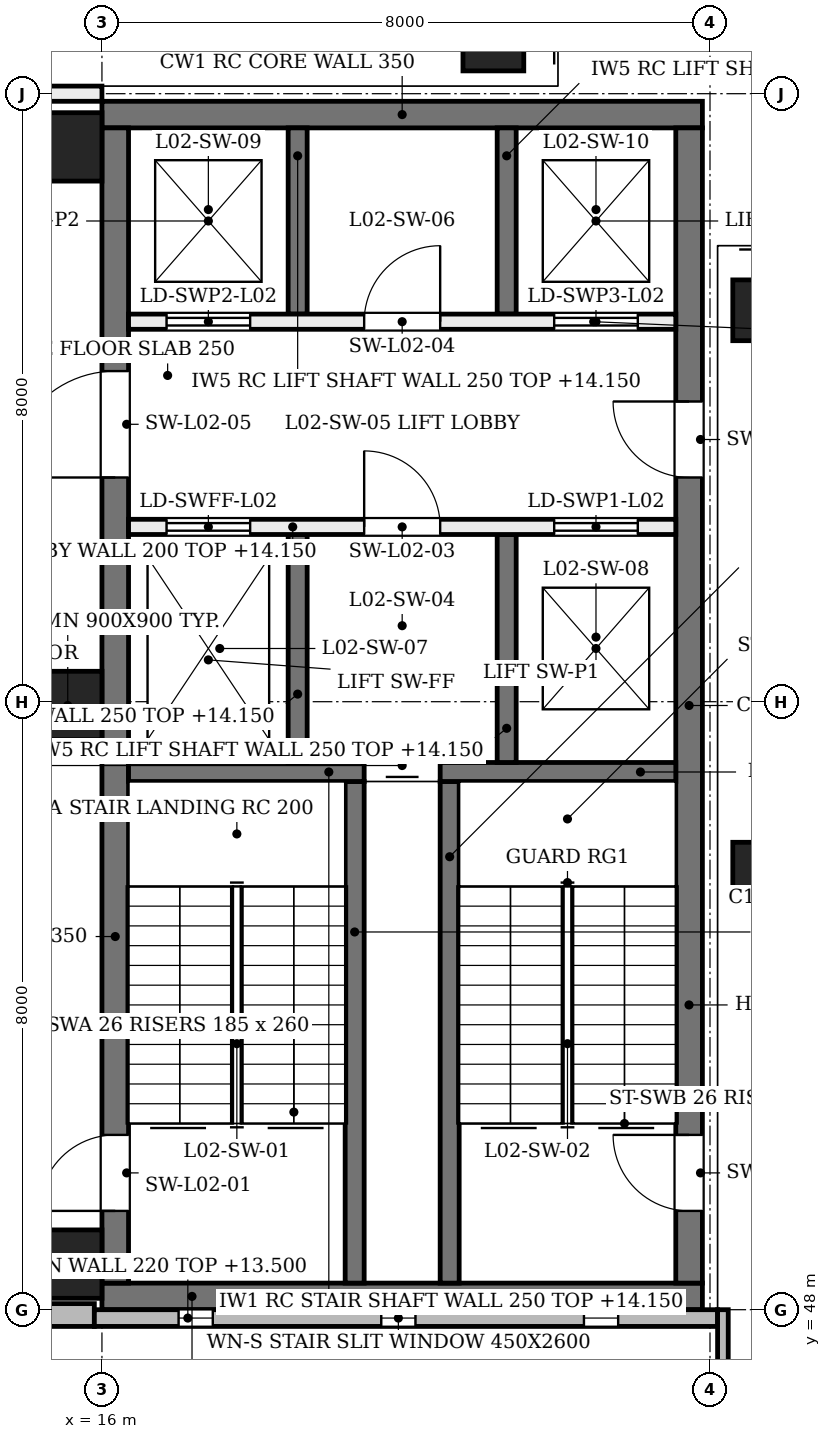
"""IFC4 building model, lengths in metres.
Left out: names, types, materials, properties, quantities, classifications, styles, units other than length and angle.
Written with IfcOpenShell. Run it as: python <this file> out.ifc"""

import sys

from ifc_helpers import new_model, si_unit, direction, frame, frame_2d, origin, origin_2d, place, context, subcontext, project, spatial, rectangle, extrude, element, fill, save


model = new_model("IFC4")
c1 = context("Model", 3, precision=1e-05, world=origin(), true_north=direction((0.0, 1.0)))
c2 = subcontext(c1, "Body", "Model", "MODEL_VIEW")
j1 = project(units=[si_unit("LENGTHUNIT", "METRE"), si_unit("PLANEANGLEUNIT", "RADIAN")], contexts=[c1])
p1 = place(None, origin())
s1 = spatial("IfcSite", under=j1, at=p1, CompositionType="ELEMENT")
p2 = place(p1, origin())
s2 = spatial("IfcBuilding", under=s1, at=p2, CompositionType="ELEMENT")
p3 = place(p2, frame((0.0, 0.0, 9.6)))
s3 = spatial("IfcBuildingStorey", under=s2, at=p3, CompositionType="ELEMENT", Elevation=9.6)
for number, where, z_axis, x_axis in (
    (1, (16.0, 48.175, 0.0), (0.0, 0.0, 1.0), (1.0, 0.0, 0.0)),
    (2, (16.0, 63.725, 0.0), (0.0, 0.0, 1.0), (1.0, 0.0, 0.0)),
):
    element("IfcWall", number, at=place(p3, frame(where, z_axis=z_axis, x_axis=x_axis)), inside=s3, PredefinedType="SHEAR", context=c2, shape_type="SweptSolid", body=[
        extrude(rectangle(XDim=7.9, YDim=0.35, at=frame_2d((3.95, 0.0))), origin(), (0.0, 0.0, 1.0), 4.58),
    ])
p4 = place(p3, frame((16.175, 48.35, 0.0), z_axis=(0.0, 0.0, 1.0), x_axis=(0.0, 1.0, 0.0)))
e3 = element("IfcWall", 3, at=p4, inside=s3, PredefinedType="SHEAR", context=c2, shape_type="SweptSolid", body=[
    extrude(rectangle(XDim=15.2, YDim=0.35, at=frame_2d((7.6, 0.0))), origin(), (0.0, 0.0, 1.0), 4.58),
])
p5 = place(p4, frame((0.95, 0.0, 0.0)))
e4 = element("IfcOpeningElement", 4, at=p5, cuts=e3, PredefinedType="OPENING", context=c2, shape_type="SweptSolid", body=[
    extrude(rectangle(XDim=1.0, YDim=2.1, at=frame_2d((0.5, 1.05))), frame((0.0, 0.185, 0.0), z_axis=(0.0, -1.0, 0.0), x_axis=(1.0, 0.0, 0.0)), (0.0, 0.0, 1.0), 0.37),
])
p6 = place(p4, frame((10.6, 0.0, 0.0)))
e5 = element("IfcOpeningElement", 5, at=p6, cuts=e3, PredefinedType="OPENING", context=c2, shape_type="SweptSolid", body=[
    extrude(rectangle(XDim=1.4, YDim=2.1, at=frame_2d((0.7, 1.05))), frame((0.0, 0.185, 0.0), z_axis=(0.0, -1.0, 0.0), x_axis=(1.0, 0.0, 0.0)), (0.0, 0.0, 1.0), 0.37),
])
p7 = place(p3, frame((23.725, 48.35, 0.0), z_axis=(0.0, 0.0, 1.0), x_axis=(0.0, 1.0, 0.0)))
e6 = element("IfcWall", 6, at=p7, inside=s3, PredefinedType="SHEAR", context=c2, shape_type="SweptSolid", body=[
    extrude(rectangle(XDim=15.2, YDim=0.35, at=frame_2d((7.6, 0.0))), origin(), (0.0, 0.0, 1.0), 4.58),
])
p8 = place(p7, frame((0.95, 0.0, 0.0)))
e7 = element("IfcOpeningElement", 7, at=p8, cuts=e6, PredefinedType="OPENING", context=c2, shape_type="SweptSolid", body=[
    extrude(rectangle(XDim=1.0, YDim=2.1, at=frame_2d((0.5, 1.05))), frame((0.0, 0.185, 0.0), z_axis=(0.0, -1.0, 0.0), x_axis=(1.0, 0.0, 0.0)), (0.0, 0.0, 1.0), 0.37),
])
p9 = place(p7, frame((10.6, 0.0, 0.0)))
e8 = element("IfcOpeningElement", 8, at=p9, cuts=e6, PredefinedType="OPENING", context=c2, shape_type="SweptSolid", body=[
    extrude(rectangle(XDim=1.0, YDim=2.1, at=frame_2d((0.5, 1.05))), frame((0.0, 0.185, 0.0), z_axis=(0.0, -1.0, 0.0), x_axis=(1.0, 0.0, 0.0)), (0.0, 0.0, 1.0), 0.37),
])
for number, where, z_axis, x_axis in (
    (9, (15.55, 48.6, 0.0), (0.0, 0.0, 1.0), (1.0, 0.0, 0.0)),
    (10, (15.55, 55.95, 0.0), (0.0, 0.0, 1.0), (1.0, 0.0, 0.0)),
    (11, (15.55, 63.3, 0.0), (0.0, 0.0, 1.0), (1.0, 0.0, 0.0)),
):
    element("IfcColumn", number, at=place(p3, frame(where, z_axis=z_axis, x_axis=x_axis)), inside=s3, PredefinedType="COLUMN", context=c2, shape_type="SweptSolid", body=[
        extrude(rectangle(XDim=0.9, YDim=0.9, at=origin_2d()), origin(), (0.0, 0.0, 1.0), 4.8),
    ])
for number, where, z_axis, x_axis in (
    (12, (24.7, 54.0, 0.0), (0.0, -0.204, 0.979), (1.0, 0.0, 0.0)),
    (13, (24.7, 61.4, 0.0), (0.0, -0.204, 0.979), (1.0, 0.0, 0.0)),
    (14, (21.4, 64.7, 0.0), (-0.204, 0.0, 0.979), (0.0, -1.0, 0.0)),
):
    element("IfcColumn", number, at=place(p3, frame(where, z_axis=z_axis, x_axis=x_axis)), inside=s3, PredefinedType="COLUMN", context=c2, shape_type="SweptSolid", body=[
        extrude(rectangle(XDim=0.8, YDim=0.8, at=origin_2d()), origin(), (0.0, 0.0, 1.0), 4.903),
    ])
p10 = place(p3, frame((8.0, 47.93, 0.0), z_axis=(0.0, 0.0, 1.0), x_axis=(1.0, 0.0, 0.0)))
e15 = element("IfcWall", 15, at=p10, inside=s3, PredefinedType="SOLIDWALL", context=c2, shape_type="SweptSolid", body=[
    extrude(rectangle(XDim=7.9, YDim=0.3, at=frame_2d((3.95, 0.0))), origin(), (0.0, 0.0, 1.0), 3.9),
])
p11 = place(p10, frame((0.717, 0.0, 0.75)))
e16 = element("IfcOpeningElement", 16, at=p11, cuts=e15, PredefinedType="OPENING", context=c2, shape_type="SweptSolid", body=[
    extrude(rectangle(XDim=1.2, YDim=3.1, at=frame_2d((0.6, 1.55))), frame((0.0, 0.16, 0.0), z_axis=(0.0, -1.0, 0.0), x_axis=(1.0, 0.0, 0.0)), (0.0, 0.0, 1.0), 0.32),
])
p12 = place(p10, frame((3.35, 0.0, 0.75)))
e17 = element("IfcOpeningElement", 17, at=p12, cuts=e15, PredefinedType="OPENING", context=c2, shape_type="SweptSolid", body=[
    extrude(rectangle(XDim=1.2, YDim=3.1, at=frame_2d((0.6, 1.55))), frame((0.0, 0.16, 0.0), z_axis=(0.0, -1.0, 0.0), x_axis=(1.0, 0.0, 0.0)), (0.0, 0.0, 1.0), 0.32),
])
p13 = place(p10, frame((5.983, 0.0, 0.75)))
e18 = element("IfcOpeningElement", 18, at=p13, cuts=e15, PredefinedType="OPENING", context=c2, shape_type="SweptSolid", body=[
    extrude(rectangle(XDim=1.2, YDim=3.1, at=frame_2d((0.6, 1.55))), frame((0.0, 0.16, 0.0), z_axis=(0.0, -1.0, 0.0), x_axis=(1.0, 0.0, 0.0)), (0.0, 0.0, 1.0), 0.32),
])
p14 = place(p3, frame((15.9, 47.89, 0.0), z_axis=(0.0, 0.0, 1.0), x_axis=(1.0, 0.0, 0.0)))
e19 = element("IfcWall", 19, at=p14, inside=s3, PredefinedType="SOLIDWALL", context=c2, shape_type="SweptSolid", body=[
    extrude(rectangle(XDim=8.2, YDim=0.22, at=frame_2d((4.1, 0.0))), origin(), (0.0, 0.0, 1.0), 3.9),
])
p15 = place(p14, frame((1.108, 0.0, 0.9)))
e20 = element("IfcOpeningElement", 20, at=p15, cuts=e19, PredefinedType="OPENING", context=c2, shape_type="SweptSolid", body=[
    extrude(rectangle(XDim=0.45, YDim=2.6, at=frame_2d((0.225, 1.3))), frame((0.0, 0.12, 0.0), z_axis=(0.0, -1.0, 0.0), x_axis=(1.0, 0.0, 0.0)), (0.0, 0.0, 1.0), 0.24),
])
p16 = place(p14, frame((3.775, 0.0, 0.9)))
e21 = element("IfcOpeningElement", 21, at=p16, cuts=e19, PredefinedType="OPENING", context=c2, shape_type="SweptSolid", body=[
    extrude(rectangle(XDim=0.45, YDim=2.6, at=frame_2d((0.225, 1.3))), frame((0.0, 0.12, 0.0), z_axis=(0.0, -1.0, 0.0), x_axis=(1.0, 0.0, 0.0)), (0.0, 0.0, 1.0), 0.24),
])
p17 = place(p14, frame((6.442, 0.0, 0.9)))
e22 = element("IfcOpeningElement", 22, at=p17, cuts=e19, PredefinedType="OPENING", context=c2, shape_type="SweptSolid", body=[
    extrude(rectangle(XDim=0.45, YDim=2.6, at=frame_2d((0.225, 1.3))), frame((0.0, 0.12, 0.0), z_axis=(0.0, -1.0, 0.0), x_axis=(1.0, 0.0, 0.0)), (0.0, 0.0, 1.0), 0.24),
])
p18 = place(p3, frame((24.17, 46.0, 0.0), z_axis=(0.0, 0.0, 1.0), x_axis=(0.0, 1.0, 0.0)))
e23 = element("IfcWall", 23, at=p18, inside=s3, PredefinedType="SOLIDWALL", context=c2, shape_type="SweptSolid", body=[
    extrude(rectangle(XDim=2.0, YDim=0.14, at=frame_2d((1.0, 0.0))), origin(), (0.0, 0.0, 1.0), 3.9),
])
for number, where, z_axis, x_axis in (
    (24, (19.325, 48.35, 0.0), (0.0, 0.0, 1.0), (0.0, 1.0, 0.0)),
    (25, (20.575, 48.35, 0.0), (0.0, 0.0, 1.0), (0.0, 1.0, 0.0)),
):
    element("IfcWall", number, at=place(p3, frame(where, z_axis=z_axis, x_axis=x_axis)), inside=s3, PredefinedType="SOLIDWALL", context=c2, shape_type="SweptSolid", body=[
        extrude(rectangle(XDim=6.6, YDim=0.25, at=frame_2d((3.3, 0.0))), origin(), (0.0, 0.0, 1.0), 4.55),
    ])
p19 = place(p3, frame((16.35, 55.075, 0.0), z_axis=(0.0, 0.0, 1.0), x_axis=(1.0, 0.0, 0.0)))
e26 = element("IfcWall", 26, at=p19, inside=s3, PredefinedType="SOLIDWALL", context=c2, shape_type="SweptSolid", body=[
    extrude(rectangle(XDim=3.1, YDim=0.25, at=frame_2d((1.55, 0.0))), origin(), (0.0, 0.0, 1.0), 4.55),
])
p20 = place(p3, frame((20.45, 55.075, 0.0), z_axis=(0.0, 0.0, 1.0), x_axis=(1.0, 0.0, 0.0)))
e27 = element("IfcWall", 27, at=p20, inside=s3, PredefinedType="SOLIDWALL", context=c2, shape_type="SweptSolid", body=[
    extrude(rectangle(XDim=3.1, YDim=0.25, at=frame_2d((1.55, 0.0))), origin(), (0.0, 0.0, 1.0), 4.55),
])
p21 = place(p3, frame((18.575, 55.2, 0.0), z_axis=(0.0, 0.0, 1.0), x_axis=(0.0, 1.0, 0.0)))
e28 = element("IfcWall", 28, at=p21, inside=s3, PredefinedType="SOLIDWALL", context=c2, shape_type="SweptSolid", body=[
    extrude(rectangle(XDim=3.0, YDim=0.25, at=frame_2d((1.5, 0.0))), origin(), (0.0, 0.0, 1.0), 4.55),
])
p22 = place(p3, frame((18.575, 61.1, 0.0), z_axis=(0.0, 0.0, 1.0), x_axis=(0.0, 1.0, 0.0)))
e29 = element("IfcWall", 29, at=p22, inside=s3, PredefinedType="SOLIDWALL", context=c2, shape_type="SweptSolid", body=[
    extrude(rectangle(XDim=2.45, YDim=0.25, at=frame_2d((1.225, 0.0))), origin(), (0.0, 0.0, 1.0), 4.55),
])
p23 = place(p3, frame((21.325, 55.2, 0.0), z_axis=(0.0, 0.0, 1.0), x_axis=(0.0, 1.0, 0.0)))
e30 = element("IfcWall", 30, at=p23, inside=s3, PredefinedType="SOLIDWALL", context=c2, shape_type="SweptSolid", body=[
    extrude(rectangle(XDim=3.0, YDim=0.25, at=frame_2d((1.5, 0.0))), origin(), (0.0, 0.0, 1.0), 4.55),
])
p24 = place(p3, frame((21.325, 61.1, 0.0), z_axis=(0.0, 0.0, 1.0), x_axis=(0.0, 1.0, 0.0)))
e31 = element("IfcWall", 31, at=p24, inside=s3, PredefinedType="SOLIDWALL", context=c2, shape_type="SweptSolid", body=[
    extrude(rectangle(XDim=2.45, YDim=0.25, at=frame_2d((1.225, 0.0))), origin(), (0.0, 0.0, 1.0), 4.55),
])
p25 = place(p3, frame((16.35, 58.3, 0.0), z_axis=(0.0, 0.0, 1.0), x_axis=(1.0, 0.0, 0.0)))
e32 = element("IfcWall", 32, at=p25, inside=s3, PredefinedType="SOLIDWALL", context=c2, shape_type="SweptSolid", body=[
    extrude(rectangle(XDim=7.2, YDim=0.2, at=frame_2d((3.6, 0.0))), origin(), (0.0, 0.0, 1.0), 4.55),
])
p26 = place(p25, frame((0.5, 0.0, 0.0)))
e33 = element("IfcOpeningElement", 33, at=p26, cuts=e32, PredefinedType="OPENING", context=c2, shape_type="SweptSolid", body=[
    extrude(rectangle(XDim=1.1, YDim=2.1, at=frame_2d((0.55, 1.05))), frame((0.0, 0.11, 0.0), z_axis=(0.0, -1.0, 0.0), x_axis=(1.0, 0.0, 0.0)), (0.0, 0.0, 1.0), 0.22),
])
p27 = place(p25, frame((5.6, 0.0, 0.0)))
e34 = element("IfcOpeningElement", 34, at=p27, cuts=e32, PredefinedType="OPENING", context=c2, shape_type="SweptSolid", body=[
    extrude(rectangle(XDim=1.1, YDim=2.1, at=frame_2d((0.55, 1.05))), frame((0.0, 0.11, 0.0), z_axis=(0.0, -1.0, 0.0), x_axis=(1.0, 0.0, 0.0)), (0.0, 0.0, 1.0), 0.22),
])
p28 = place(p25, frame((3.1, 0.0, 0.0)))
e35 = element("IfcOpeningElement", 35, at=p28, cuts=e32, PredefinedType="OPENING", context=c2, shape_type="SweptSolid", body=[
    extrude(rectangle(XDim=1.0, YDim=2.1, at=frame_2d((0.5, 1.05))), frame((0.0, 0.11, 0.0), z_axis=(0.0, -1.0, 0.0), x_axis=(1.0, 0.0, 0.0)), (0.0, 0.0, 1.0), 0.22),
])
p29 = place(p3, frame((16.35, 61.0, 0.0), z_axis=(0.0, 0.0, 1.0), x_axis=(1.0, 0.0, 0.0)))
e36 = element("IfcWall", 36, at=p29, inside=s3, PredefinedType="SOLIDWALL", context=c2, shape_type="SweptSolid", body=[
    extrude(rectangle(XDim=7.2, YDim=0.2, at=frame_2d((3.6, 0.0))), origin(), (0.0, 0.0, 1.0), 4.55),
])
p30 = place(p29, frame((0.5, 0.0, 0.0)))
e37 = element("IfcOpeningElement", 37, at=p30, cuts=e36, PredefinedType="OPENING", context=c2, shape_type="SweptSolid", body=[
    extrude(rectangle(XDim=1.1, YDim=2.1, at=frame_2d((0.55, 1.05))), frame((0.0, 0.11, 0.0), z_axis=(0.0, -1.0, 0.0), x_axis=(1.0, 0.0, 0.0)), (0.0, 0.0, 1.0), 0.22),
])
p31 = place(p29, frame((5.6, 0.0, 0.0)))
e38 = element("IfcOpeningElement", 38, at=p31, cuts=e36, PredefinedType="OPENING", context=c2, shape_type="SweptSolid", body=[
    extrude(rectangle(XDim=1.1, YDim=2.1, at=frame_2d((0.55, 1.05))), frame((0.0, 0.11, 0.0), z_axis=(0.0, -1.0, 0.0), x_axis=(1.0, 0.0, 0.0)), (0.0, 0.0, 1.0), 0.22),
])
p32 = place(p29, frame((3.1, 0.0, 0.0)))
e39 = element("IfcOpeningElement", 39, at=p32, cuts=e36, PredefinedType="OPENING", context=c2, shape_type="SweptSolid", body=[
    extrude(rectangle(XDim=1.0, YDim=2.1, at=frame_2d((0.5, 1.05))), frame((0.0, 0.11, 0.0), z_axis=(0.0, -1.0, 0.0), x_axis=(1.0, 0.0, 0.0)), (0.0, 0.0, 1.0), 0.22),
])
p33 = place(p3, frame((12.4, 64.0, 0.0), z_axis=(0.0, 0.0, 1.0), x_axis=(1.0, 0.0, 0.0)))
e40 = element("IfcWall", 40, at=p33, inside=s3, PredefinedType="PARTITIONING", context=c2, shape_type="SweptSolid", body=[
    extrude(rectangle(XDim=3.6, YDim=0.2, at=frame_2d((1.8, 0.0))), origin(), (0.0, 0.0, 1.0), 3.88),
])
p34 = place(p33, frame((1.8, 0.0, 0.0)))
e41 = element("IfcOpeningElement", 41, at=p34, cuts=e40, PredefinedType="OPENING", context=c2, shape_type="SweptSolid", body=[
    extrude(rectangle(XDim=0.9, YDim=2.1, at=frame_2d((0.45, 1.05))), frame((0.0, 0.11, 0.0), z_axis=(0.0, -1.0, 0.0), x_axis=(1.0, 0.0, 0.0)), (0.0, 0.0, 1.0), 0.22),
])
p35 = place(p15, origin())
e42 = element("IfcWindow", 42, at=p35, inside=s3, PartitioningType="SINGLE_PANEL", PredefinedType="WINDOW", context=c2, shape_type="SweptSolid", body=[
    extrude(rectangle(XDim=0.45, YDim=2.6, at=frame_2d((0.225, 1.3))), frame((0.0, 0.03, 0.0), z_axis=(0.0, -1.0, 0.0), x_axis=(1.0, 0.0, 0.0)), (0.0, 0.0, 1.0), 0.06),
])
fill(e20, e42)
p36 = place(p16, origin())
e43 = element("IfcWindow", 43, at=p36, inside=s3, PartitioningType="SINGLE_PANEL", PredefinedType="WINDOW", context=c2, shape_type="SweptSolid", body=[
    extrude(rectangle(XDim=0.45, YDim=2.6, at=frame_2d((0.225, 1.3))), frame((0.0, 0.03, 0.0), z_axis=(0.0, -1.0, 0.0), x_axis=(1.0, 0.0, 0.0)), (0.0, 0.0, 1.0), 0.06),
])
fill(e21, e43)
p37 = place(p17, origin())
e44 = element("IfcWindow", 44, at=p37, inside=s3, PartitioningType="SINGLE_PANEL", PredefinedType="WINDOW", context=c2, shape_type="SweptSolid", body=[
    extrude(rectangle(XDim=0.45, YDim=2.6, at=frame_2d((0.225, 1.3))), frame((0.0, 0.03, 0.0), z_axis=(0.0, -1.0, 0.0), x_axis=(1.0, 0.0, 0.0)), (0.0, 0.0, 1.0), 0.06),
])
fill(e22, e44)
p38 = place(p5, origin())
e45 = element("IfcDoor", 45, at=p38, inside=s3, OperationType="SINGLE_SWING_LEFT", PredefinedType="DOOR", context=c2, shape_type="SweptSolid", body=[
    extrude(rectangle(XDim=1.0, YDim=2.1, at=frame_2d((0.5, 1.05))), frame((0.0, 0.025, 0.0), z_axis=(0.0, -1.0, 0.0), x_axis=(1.0, 0.0, 0.0)), (0.0, 0.0, 1.0), 0.05),
])
fill(e4, e45)
p39 = place(p8, frame((1.0, 0.0, 0.0), z_axis=(0.0, 0.0, 1.0), x_axis=(-1.0, 0.0, 0.0)))
e46 = element("IfcDoor", 46, at=p39, inside=s3, OperationType="SINGLE_SWING_RIGHT", PredefinedType="DOOR", context=c2, shape_type="SweptSolid", body=[
    extrude(rectangle(XDim=1.0, YDim=2.1, at=frame_2d((0.5, 1.05))), frame((0.0, 0.025, 0.0), z_axis=(0.0, -1.0, 0.0), x_axis=(1.0, 0.0, 0.0)), (0.0, 0.0, 1.0), 0.05),
])
fill(e7, e46)
p40 = place(p26, origin())
e47 = element("IfcDoor", 47, at=p40, inside=s3, OperationType="DOUBLE_DOOR_SLIDING", PredefinedType="DOOR", context=c2, shape_type="SweptSolid", body=[
    extrude(rectangle(XDim=1.1, YDim=2.1, at=frame_2d((0.55, 1.05))), frame((0.0, 0.025, 0.0), z_axis=(0.0, -1.0, 0.0), x_axis=(1.0, 0.0, 0.0)), (0.0, 0.0, 1.0), 0.05),
])
fill(e33, e47)
p41 = place(p27, origin())
e48 = element("IfcDoor", 48, at=p41, inside=s3, OperationType="DOUBLE_DOOR_SLIDING", PredefinedType="DOOR", context=c2, shape_type="SweptSolid", body=[
    extrude(rectangle(XDim=1.1, YDim=2.1, at=frame_2d((0.55, 1.05))), frame((0.0, 0.025, 0.0), z_axis=(0.0, -1.0, 0.0), x_axis=(1.0, 0.0, 0.0)), (0.0, 0.0, 1.0), 0.05),
])
fill(e34, e48)
p42 = place(p30, frame((1.1, 0.0, 0.0), z_axis=(0.0, 0.0, 1.0), x_axis=(-1.0, 0.0, 0.0)))
e49 = element("IfcDoor", 49, at=p42, inside=s3, OperationType="DOUBLE_DOOR_SLIDING", PredefinedType="DOOR", context=c2, shape_type="SweptSolid", body=[
    extrude(rectangle(XDim=1.1, YDim=2.1, at=frame_2d((0.55, 1.05))), frame((0.0, 0.025, 0.0), z_axis=(0.0, -1.0, 0.0), x_axis=(1.0, 0.0, 0.0)), (0.0, 0.0, 1.0), 0.05),
])
fill(e37, e49)
p43 = place(p31, frame((1.1, 0.0, 0.0), z_axis=(0.0, 0.0, 1.0), x_axis=(-1.0, 0.0, 0.0)))
e50 = element("IfcDoor", 50, at=p43, inside=s3, OperationType="DOUBLE_DOOR_SLIDING", PredefinedType="DOOR", context=c2, shape_type="SweptSolid", body=[
    extrude(rectangle(XDim=1.1, YDim=2.1, at=frame_2d((0.55, 1.05))), frame((0.0, 0.025, 0.0), z_axis=(0.0, -1.0, 0.0), x_axis=(1.0, 0.0, 0.0)), (0.0, 0.0, 1.0), 0.05),
])
fill(e38, e50)
p44 = place(p28, origin())
e51 = element("IfcDoor", 51, at=p44, inside=s3, OperationType="SINGLE_SWING_LEFT", PredefinedType="DOOR", context=c2, shape_type="SweptSolid", body=[
    extrude(rectangle(XDim=1.0, YDim=2.1, at=frame_2d((0.5, 1.05))), frame((0.0, 0.025, 0.0), z_axis=(0.0, -1.0, 0.0), x_axis=(1.0, 0.0, 0.0)), (0.0, 0.0, 1.0), 0.05),
])
fill(e35, e51)
p45 = place(p32, frame((1.0, 0.0, 0.0), z_axis=(0.0, 0.0, 1.0), x_axis=(-1.0, 0.0, 0.0)))
e52 = element("IfcDoor", 52, at=p45, inside=s3, OperationType="SINGLE_SWING_RIGHT", PredefinedType="DOOR", context=c2, shape_type="SweptSolid", body=[
    extrude(rectangle(XDim=1.0, YDim=2.1, at=frame_2d((0.5, 1.05))), frame((0.0, 0.025, 0.0), z_axis=(0.0, -1.0, 0.0), x_axis=(1.0, 0.0, 0.0)), (0.0, 0.0, 1.0), 0.05),
])
fill(e39, e52)
p46 = place(p6, origin())
e53 = element("IfcDoor", 53, at=p46, inside=s3, OperationType="SINGLE_SWING_LEFT", PredefinedType="DOOR", context=c2, shape_type="SweptSolid", body=[
    extrude(rectangle(XDim=1.4, YDim=2.1, at=frame_2d((0.7, 1.05))), frame((0.0, 0.025, 0.0), z_axis=(0.0, -1.0, 0.0), x_axis=(1.0, 0.0, 0.0)), (0.0, 0.0, 1.0), 0.05),
])
fill(e5, e53)
p47 = place(p9, frame((1.0, 0.0, 0.0), z_axis=(0.0, 0.0, 1.0), x_axis=(-1.0, 0.0, 0.0)))
e54 = element("IfcDoor", 54, at=p47, inside=s3, OperationType="SINGLE_SWING_RIGHT", PredefinedType="DOOR", context=c2, shape_type="SweptSolid", body=[
    extrude(rectangle(XDim=1.0, YDim=2.1, at=frame_2d((0.5, 1.05))), frame((0.0, 0.025, 0.0), z_axis=(0.0, -1.0, 0.0), x_axis=(1.0, 0.0, 0.0)), (0.0, 0.0, 1.0), 0.05),
])
fill(e8, e54)
save(model, sys.argv[1])
